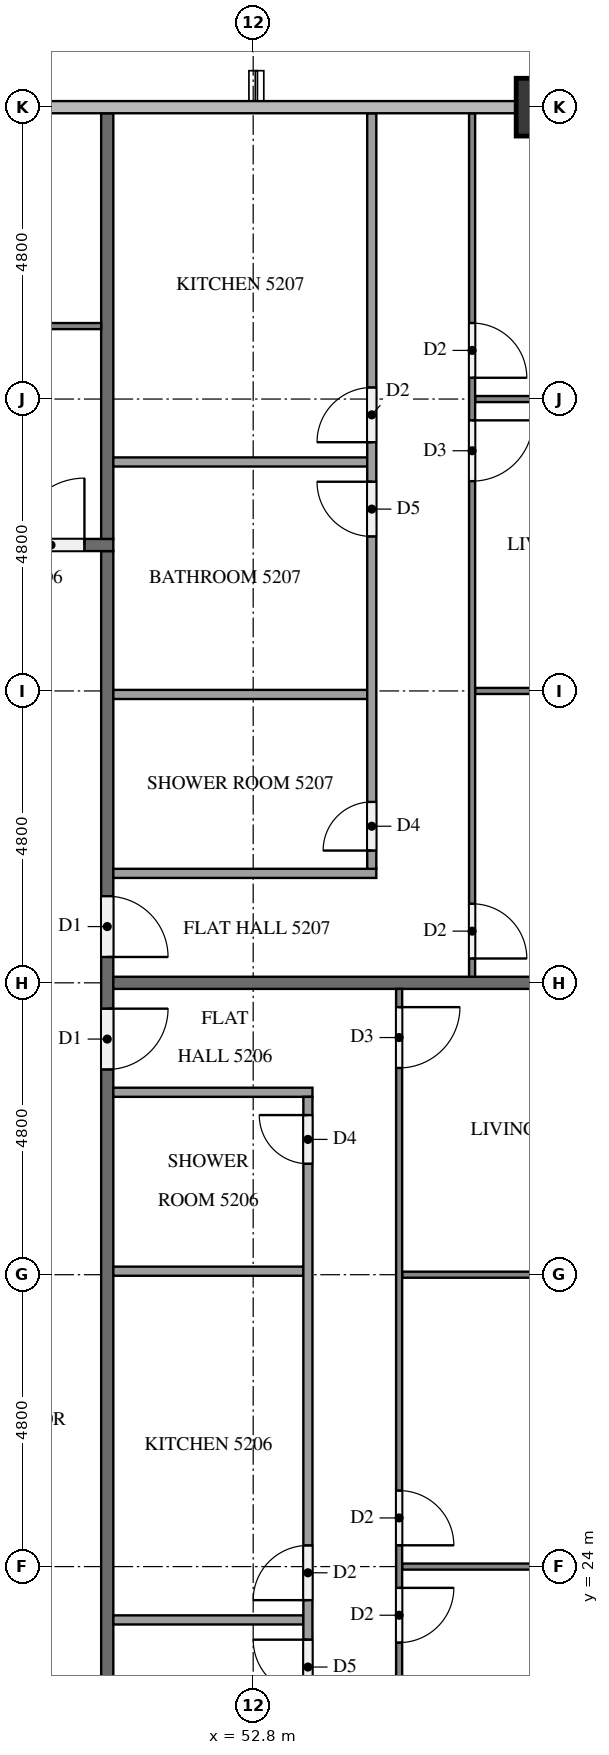
"""IFC4 building model, lengths in metres.
Left out: names, types, materials, properties, quantities, classifications, styles, units other than length and angle.
Written with IfcOpenShell. Run it as: python <this file> out.ifc"""

import sys

from ifc_helpers import new_model, si_unit, direction, frame, frame_2d, origin, origin_2d, place, context, subcontext, project, spatial, rectangle, extrude, element, fill, save


model = new_model("IFC4")
c1 = context("Model", 3, precision=1e-05, world=origin(), true_north=direction((0.0, 1.0)))
c2 = subcontext(c1, "Body", "Model", "MODEL_VIEW")
j1 = project(units=[si_unit("LENGTHUNIT", "METRE"), si_unit("PLANEANGLEUNIT", "RADIAN")], contexts=[c1])
p1 = place(None, origin())
s1 = spatial("IfcSite", under=j1, at=p1, CompositionType="ELEMENT")
p2 = place(p1, origin())
s2 = spatial("IfcBuilding", under=s1, at=p2, CompositionType="ELEMENT")
p3 = place(p2, frame((0.0, 0.0, 199.9)))
s3 = spatial("IfcBuildingStorey", under=s2, at=p3, CompositionType="ELEMENT", Elevation=199.9)
p4 = place(p3, frame((57.6, 48.0, 0.0), z_axis=(0.0, 0.0, 1.0), x_axis=(1.0, 0.0, 0.0)))
e1 = element("IfcColumn", 1, at=p4, inside=s3, PredefinedType="COLUMN", context=c2, shape_type="SweptSolid", body=[
    extrude(rectangle(XDim=0.95, YDim=0.95, at=origin_2d()), origin(), (0.0, 0.0, 1.0), 3.1),
])
p5 = place(p3, frame((50.4, 40.7, 0.0), z_axis=(0.0, 0.0, 1.0), x_axis=(0.0, -1.0, 0.0)))
e2 = element("IfcWall", 2, at=p5, inside=s3, PredefinedType="PARTITIONING", context=c2, shape_type="SweptSolid", body=[
    extrude(rectangle(XDim=28.6, YDim=0.2, at=frame_2d((14.3, 0.0))), origin(), (0.0, 0.0, 1.0), 3.1),
])
p6 = place(p5, frame((21.875, 0.0, 0.0)))
e3 = element("IfcOpeningElement", 3, at=p6, cuts=e2, PredefinedType="OPENING", context=c2, shape_type="SweptSolid", body=[
    extrude(rectangle(XDim=1.1, YDim=2.1, at=frame_2d((0.55, 1.05))), frame((0.0, 0.11, 0.0), z_axis=(0.0, -1.0, 0.0), x_axis=(1.0, 0.0, 0.0)), (0.0, 0.0, 1.0), 0.22),
])
p7 = place(p5, frame((7.525, 0.0, 0.0)))
e4 = element("IfcOpeningElement", 4, at=p7, cuts=e2, PredefinedType="OPENING", context=c2, shape_type="SweptSolid", body=[
    extrude(rectangle(XDim=1.0, YDim=2.1, at=frame_2d((0.5, 1.05))), frame((0.0, 0.11, 0.0), z_axis=(0.0, -1.0, 0.0), x_axis=(1.0, 0.0, 0.0)), (0.0, 0.0, 1.0), 0.22),
])
p8 = place(p5, frame((5.675, 0.0, 0.0)))
e5 = element("IfcOpeningElement", 5, at=p8, cuts=e2, PredefinedType="OPENING", context=c2, shape_type="SweptSolid", body=[
    extrude(rectangle(XDim=1.0, YDim=2.1, at=frame_2d((0.5, 1.05))), frame((0.0, 0.11, 0.0), z_axis=(0.0, -1.0, 0.0), x_axis=(1.0, 0.0, 0.0)), (0.0, 0.0, 1.0), 0.22),
])
p9 = place(p3, frame((11.9, 40.8, 0.0), z_axis=(0.0, 0.0, 1.0), x_axis=(1.0, 0.0, 0.0)))
e6 = element("IfcWall", 6, at=p9, inside=s3, PredefinedType="PARTITIONING", context=c2, shape_type="SweptSolid", body=[
    extrude(rectangle(XDim=38.6, YDim=0.2, at=frame_2d((19.3, 0.0))), origin(), (0.0, 0.0, 1.0), 3.1),
])
p10 = place(p9, frame((37.025, 0.0, 0.0)))
e7 = element("IfcOpeningElement", 7, at=p10, cuts=e6, PredefinedType="OPENING", context=c2, shape_type="SweptSolid", body=[
    extrude(rectangle(XDim=1.1, YDim=2.1, at=frame_2d((0.55, 1.05))), frame((0.0, 0.11, 0.0), z_axis=(0.0, -1.0, 0.0), x_axis=(1.0, 0.0, 0.0)), (0.0, 0.0, 1.0), 0.22),
])
p11 = place(p9, frame((17.825, 0.0, 0.0)))
e8 = element("IfcOpeningElement", 8, at=p11, cuts=e6, PredefinedType="OPENING", context=c2, shape_type="SweptSolid", body=[
    extrude(rectangle(XDim=1.1, YDim=2.1, at=frame_2d((0.55, 1.05))), frame((0.0, 0.11, 0.0), z_axis=(0.0, -1.0, 0.0), x_axis=(1.0, 0.0, 0.0)), (0.0, 0.0, 1.0), 0.22),
])
p12 = place(p3, frame((50.5, 33.6, 0.0), z_axis=(0.0, 0.0, 1.0), x_axis=(1.0, 0.0, 0.0)))
e9 = element("IfcWall", 9, at=p12, inside=s3, PredefinedType="PARTITIONING", context=c2, shape_type="SweptSolid", body=[
    extrude(rectangle(XDim=11.575, YDim=0.2, at=frame_2d((5.788, 0.0))), origin(), (0.0, 0.0, 1.0), 3.1),
])
p13 = place(p3, frame((50.4, 40.9, 0.0), z_axis=(0.0, 0.0, 1.0), x_axis=(0.0, 1.0, 0.0)))
e10 = element("IfcWall", 10, at=p13, inside=s3, PredefinedType="PARTITIONING", context=c2, shape_type="SweptSolid", body=[
    extrude(rectangle(XDim=7.0, YDim=0.2, at=frame_2d((3.5, 0.0))), origin(), (0.0, 0.0, 1.0), 3.1),
])
p14 = place(p3, frame((55.25, 28.8, 0.0), z_axis=(0.0, 0.0, 1.0), x_axis=(1.0, 0.0, 0.0)))
e11 = element("IfcWall", 11, at=p14, inside=s3, PredefinedType="PARTITIONING", context=c2, shape_type="SweptSolid", body=[
    extrude(rectangle(XDim=7.05, YDim=0.1, at=frame_2d((3.525, 0.0))), origin(), (0.0, 0.0, 1.0), 3.1),
])
p15 = place(p3, frame((55.25, 24.0, 0.0), z_axis=(0.0, 0.0, 1.0), x_axis=(1.0, 0.0, 0.0)))
e12 = element("IfcWall", 12, at=p15, inside=s3, PredefinedType="PARTITIONING", context=c2, shape_type="SweptSolid", body=[
    extrude(rectangle(XDim=6.825, YDim=0.1, at=frame_2d((3.413, 0.0))), origin(), (0.0, 0.0, 1.0), 3.1),
])
p16 = place(p3, frame((55.2, 33.5, 0.0), z_axis=(0.0, 0.0, 1.0), x_axis=(0.0, -1.0, 0.0)))
e13 = element("IfcWall", 13, at=p16, inside=s3, PredefinedType="PARTITIONING", context=c2, shape_type="SweptSolid", body=[
    extrude(rectangle(XDim=14.2, YDim=0.1, at=frame_2d((7.1, 0.0))), origin(), (0.0, 0.0, 1.0), 3.1),
])
p17 = place(p16, frame((0.3, 0.0, 0.0)))
e14 = element("IfcOpeningElement", 14, at=p17, cuts=e13, PredefinedType="OPENING", context=c2, shape_type="SweptSolid", body=[
    extrude(rectangle(XDim=1.0, YDim=2.1, at=frame_2d((0.5, 1.05))), frame((0.0, 0.06, 0.0), z_axis=(0.0, -1.0, 0.0), x_axis=(1.0, 0.0, 0.0)), (0.0, 0.0, 1.0), 0.12),
])
p18 = place(p16, frame((8.25, 0.0, 0.0)))
e15 = element("IfcOpeningElement", 15, at=p18, cuts=e13, PredefinedType="OPENING", context=c2, shape_type="SweptSolid", body=[
    extrude(rectangle(XDim=0.9, YDim=2.1, at=frame_2d((0.45, 1.05))), frame((0.0, 0.06, 0.0), z_axis=(0.0, -1.0, 0.0), x_axis=(1.0, 0.0, 0.0)), (0.0, 0.0, 1.0), 0.12),
])
p19 = place(p16, frame((9.85, 0.0, 0.0)))
e16 = element("IfcOpeningElement", 16, at=p19, cuts=e13, PredefinedType="OPENING", context=c2, shape_type="SweptSolid", body=[
    extrude(rectangle(XDim=0.9, YDim=2.1, at=frame_2d((0.45, 1.05))), frame((0.0, 0.06, 0.0), z_axis=(0.0, -1.0, 0.0), x_axis=(1.0, 0.0, 0.0)), (0.0, 0.0, 1.0), 0.12),
])
for number, where, z_axis, x_axis in (
    (17, (50.5, 28.858, 0.0), (0.0, 0.0, 1.0), (1.0, 0.0, 0.0)),
    (18, (50.5, 23.123, 0.0), (0.0, 0.0, 1.0), (1.0, 0.0, 0.0)),
):
    element("IfcWall", number, at=place(p3, frame(where, z_axis=z_axis, x_axis=x_axis)), inside=s3, PredefinedType="PARTITIONING", context=c2, shape_type="SweptSolid", body=[
        extrude(rectangle(XDim=3.125, YDim=0.15, at=frame_2d((1.562, 0.0))), origin(), (0.0, 0.0, 1.0), 3.1),
    ])
p20 = place(p3, frame((50.5, 31.8, 0.0), z_axis=(0.0, 0.0, 1.0), x_axis=(1.0, 0.0, 0.0)))
e19 = element("IfcWall", 19, at=p20, inside=s3, PredefinedType="PARTITIONING", context=c2, shape_type="SweptSolid", body=[
    extrude(rectangle(XDim=3.275, YDim=0.15, at=frame_2d((1.637, 0.0))), origin(), (0.0, 0.0, 1.0), 3.1),
])
p21 = place(p3, frame((53.7, 19.3, 0.0), z_axis=(0.0, 0.0, 1.0), x_axis=(0.0, 1.0, 0.0)))
e20 = element("IfcWall", 20, at=p21, inside=s3, PredefinedType="PARTITIONING", context=c2, shape_type="SweptSolid", body=[
    extrude(rectangle(XDim=12.425, YDim=0.15, at=frame_2d((6.212, 0.0))), origin(), (0.0, 0.0, 1.0), 3.1),
])
p22 = place(p21, frame((11.325, 0.0, 0.0)))
e21 = element("IfcOpeningElement", 21, at=p22, cuts=e20, PredefinedType="OPENING", context=c2, shape_type="SweptSolid", body=[
    extrude(rectangle(XDim=0.8, YDim=2.1, at=frame_2d((0.4, 1.05))), frame((0.0, 0.085, 0.0), z_axis=(0.0, -1.0, 0.0), x_axis=(1.0, 0.0, 0.0)), (0.0, 0.0, 1.0), 0.17),
])
p23 = place(p21, frame((4.148, 0.0, 0.0)))
e22 = element("IfcOpeningElement", 22, at=p23, cuts=e20, PredefinedType="OPENING", context=c2, shape_type="SweptSolid", body=[
    extrude(rectangle(XDim=0.9, YDim=2.1, at=frame_2d((0.45, 1.05))), frame((0.0, 0.085, 0.0), z_axis=(0.0, -1.0, 0.0), x_axis=(1.0, 0.0, 0.0)), (0.0, 0.0, 1.0), 0.17),
])
p24 = place(p21, frame((2.598, 0.0, 0.0)))
e23 = element("IfcOpeningElement", 23, at=p24, cuts=e20, PredefinedType="OPENING", context=c2, shape_type="SweptSolid", body=[
    extrude(rectangle(XDim=0.9, YDim=2.1, at=frame_2d((0.45, 1.05))), frame((0.0, 0.085, 0.0), z_axis=(0.0, -1.0, 0.0), x_axis=(1.0, 0.0, 0.0)), (0.0, 0.0, 1.0), 0.17),
])
p25 = place(p3, frame((56.45, 38.4, 0.0), z_axis=(0.0, 0.0, 1.0), x_axis=(1.0, 0.0, 0.0)))
e24 = element("IfcWall", 24, at=p25, inside=s3, PredefinedType="PARTITIONING", context=c2, shape_type="SweptSolid", body=[
    extrude(rectangle(XDim=5.85, YDim=0.1, at=frame_2d((2.925, 0.0))), origin(), (0.0, 0.0, 1.0), 3.1),
])
p26 = place(p3, frame((56.45, 43.2, 0.0), z_axis=(0.0, 0.0, 1.0), x_axis=(1.0, 0.0, 0.0)))
e25 = element("IfcWall", 25, at=p26, inside=s3, PredefinedType="PARTITIONING", context=c2, shape_type="SweptSolid", body=[
    extrude(rectangle(XDim=5.475, YDim=0.1, at=frame_2d((2.738, 0.0))), origin(), (0.0, 0.0, 1.0), 3.1),
])
p27 = place(p3, frame((56.4, 47.9, 0.0), z_axis=(0.0, 0.0, 1.0), x_axis=(0.0, -1.0, 0.0)))
e26 = element("IfcWall", 26, at=p27, inside=s3, PredefinedType="PARTITIONING", context=c2, shape_type="SweptSolid", body=[
    extrude(rectangle(XDim=14.2, YDim=0.1, at=frame_2d((7.1, 0.0))), origin(), (0.0, 0.0, 1.0), 3.1),
])
p28 = place(p27, frame((13.0, 0.0, 0.0)))
e27 = element("IfcOpeningElement", 27, at=p28, cuts=e26, PredefinedType="OPENING", context=c2, shape_type="SweptSolid", body=[
    extrude(rectangle(XDim=0.9, YDim=2.1, at=frame_2d((0.45, 1.05))), frame((0.0, 0.06, 0.0), z_axis=(0.0, -1.0, 0.0), x_axis=(1.0, 0.0, 0.0)), (0.0, 0.0, 1.0), 0.12),
])
p29 = place(p27, frame((5.05, 0.0, 0.0)))
e28 = element("IfcOpeningElement", 28, at=p29, cuts=e26, PredefinedType="OPENING", context=c2, shape_type="SweptSolid", body=[
    extrude(rectangle(XDim=1.0, YDim=2.1, at=frame_2d((0.5, 1.05))), frame((0.0, 0.06, 0.0), z_axis=(0.0, -1.0, 0.0), x_axis=(1.0, 0.0, 0.0)), (0.0, 0.0, 1.0), 0.12),
])
p30 = place(p27, frame((3.45, 0.0, 0.0)))
e29 = element("IfcOpeningElement", 29, at=p30, cuts=e26, PredefinedType="OPENING", context=c2, shape_type="SweptSolid", body=[
    extrude(rectangle(XDim=0.9, YDim=2.1, at=frame_2d((0.45, 1.05))), frame((0.0, 0.06, 0.0), z_axis=(0.0, -1.0, 0.0), x_axis=(1.0, 0.0, 0.0)), (0.0, 0.0, 1.0), 0.12),
])
for number, where, z_axis, x_axis in (
    (30, (50.5, 38.342, 0.0), (0.0, 0.0, 1.0), (1.0, 0.0, 0.0)),
    (31, (50.5, 42.165, 0.0), (0.0, 0.0, 1.0), (1.0, 0.0, 0.0)),
):
    element("IfcWall", number, at=place(p3, frame(where, z_axis=z_axis, x_axis=x_axis)), inside=s3, PredefinedType="PARTITIONING", context=c2, shape_type="SweptSolid", body=[
        extrude(rectangle(XDim=4.175, YDim=0.15, at=frame_2d((2.087, 0.0))), origin(), (0.0, 0.0, 1.0), 3.1),
    ])
p31 = place(p3, frame((50.5, 35.4, 0.0), z_axis=(0.0, 0.0, 1.0), x_axis=(1.0, 0.0, 0.0)))
e32 = element("IfcWall", 32, at=p31, inside=s3, PredefinedType="PARTITIONING", context=c2, shape_type="SweptSolid", body=[
    extrude(rectangle(XDim=4.325, YDim=0.15, at=frame_2d((2.163, 0.0))), origin(), (0.0, 0.0, 1.0), 3.1),
])
p32 = place(p3, frame((54.75, 35.475, 0.0), z_axis=(0.0, 0.0, 1.0), x_axis=(0.0, 1.0, 0.0)))
e33 = element("IfcWall", 33, at=p32, inside=s3, PredefinedType="PARTITIONING", context=c2, shape_type="SweptSolid", body=[
    extrude(rectangle(XDim=12.425, YDim=0.15, at=frame_2d((6.212, 0.0))), origin(), (0.0, 0.0, 1.0), 3.1),
])
p33 = place(p32, frame((0.3, 0.0, 0.0)))
e34 = element("IfcOpeningElement", 34, at=p33, cuts=e33, PredefinedType="OPENING", context=c2, shape_type="SweptSolid", body=[
    extrude(rectangle(XDim=0.8, YDim=2.1, at=frame_2d((0.4, 1.05))), frame((0.0, 0.085, 0.0), z_axis=(0.0, -1.0, 0.0), x_axis=(1.0, 0.0, 0.0)), (0.0, 0.0, 1.0), 0.17),
])
p34 = place(p32, frame((5.465, 0.0, 0.0)))
e35 = element("IfcOpeningElement", 35, at=p34, cuts=e33, PredefinedType="OPENING", context=c2, shape_type="SweptSolid", body=[
    extrude(rectangle(XDim=0.9, YDim=2.1, at=frame_2d((0.45, 1.05))), frame((0.0, 0.085, 0.0), z_axis=(0.0, -1.0, 0.0), x_axis=(1.0, 0.0, 0.0)), (0.0, 0.0, 1.0), 0.17),
])
p35 = place(p32, frame((7.015, 0.0, 0.0)))
e36 = element("IfcOpeningElement", 36, at=p35, cuts=e33, PredefinedType="OPENING", context=c2, shape_type="SweptSolid", body=[
    extrude(rectangle(XDim=0.9, YDim=2.1, at=frame_2d((0.45, 1.05))), frame((0.0, 0.085, 0.0), z_axis=(0.0, -1.0, 0.0), x_axis=(1.0, 0.0, 0.0)), (0.0, 0.0, 1.0), 0.17),
])
p36 = place(p3, frame((31.3, 44.4, 0.0), z_axis=(0.0, 0.0, 1.0), x_axis=(1.0, 0.0, 0.0)))
e37 = element("IfcWall", 37, at=p36, inside=s3, PredefinedType="PARTITIONING", context=c2, shape_type="SweptSolid", body=[
    extrude(rectangle(XDim=19.0, YDim=0.1, at=frame_2d((9.5, 0.0))), origin(), (0.0, 0.0, 1.0), 3.1),
])
p37 = place(p36, frame((14.65, 0.0, 0.0)))
e38 = element("IfcOpeningElement", 38, at=p37, cuts=e37, PredefinedType="OPENING", context=c2, shape_type="SweptSolid", body=[
    extrude(rectangle(XDim=0.9, YDim=2.1, at=frame_2d((0.45, 1.05))), frame((0.0, 0.06, 0.0), z_axis=(0.0, -1.0, 0.0), x_axis=(1.0, 0.0, 0.0)), (0.0, 0.0, 1.0), 0.12),
])
p38 = place(p36, frame((12.95, 0.0, 0.0)))
e39 = element("IfcOpeningElement", 39, at=p38, cuts=e37, PredefinedType="OPENING", context=c2, shape_type="SweptSolid", body=[
    extrude(rectangle(XDim=1.0, YDim=2.1, at=frame_2d((0.5, 1.05))), frame((0.0, 0.06, 0.0), z_axis=(0.0, -1.0, 0.0), x_axis=(1.0, 0.0, 0.0)), (0.0, 0.0, 1.0), 0.12),
])
p39 = place(p36, frame((5.05, 0.0, 0.0)))
e40 = element("IfcOpeningElement", 40, at=p39, cuts=e37, PredefinedType="OPENING", context=c2, shape_type="SweptSolid", body=[
    extrude(rectangle(XDim=0.9, YDim=2.1, at=frame_2d((0.45, 1.05))), frame((0.0, 0.06, 0.0), z_axis=(0.0, -1.0, 0.0), x_axis=(1.0, 0.0, 0.0)), (0.0, 0.0, 1.0), 0.12),
])
p40 = place(p36, frame((3.45, 0.0, 0.0)))
e41 = element("IfcOpeningElement", 41, at=p40, cuts=e37, PredefinedType="OPENING", context=c2, shape_type="SweptSolid", body=[
    extrude(rectangle(XDim=0.9, YDim=2.1, at=frame_2d((0.45, 1.05))), frame((0.0, 0.06, 0.0), z_axis=(0.0, -1.0, 0.0), x_axis=(1.0, 0.0, 0.0)), (0.0, 0.0, 1.0), 0.12),
])
p41 = place(p7, origin())
e42 = element("IfcDoor", 42, at=p41, inside=s3, OperationType="SINGLE_SWING_LEFT", PredefinedType="DOOR", context=c2, shape_type="SweptSolid", body=[
    extrude(rectangle(XDim=1.0, YDim=2.1, at=frame_2d((0.5, 1.05))), frame((0.0, 0.025, 0.0), z_axis=(0.0, -1.0, 0.0), x_axis=(1.0, 0.0, 0.0)), (0.0, 0.0, 1.0), 0.05),
])
fill(e4, e42)
p42 = place(p8, origin())
e43 = element("IfcDoor", 43, at=p42, inside=s3, OperationType="SINGLE_SWING_RIGHT", PredefinedType="DOOR", context=c2, shape_type="SweptSolid", body=[
    extrude(rectangle(XDim=1.0, YDim=2.1, at=frame_2d((0.5, 1.05))), frame((0.0, 0.025, 0.0), z_axis=(0.0, -1.0, 0.0), x_axis=(1.0, 0.0, 0.0)), (0.0, 0.0, 1.0), 0.05),
])
fill(e5, e43)
p43 = place(p10, origin())
e44 = element("IfcDoor", 44, at=p43, inside=s3, OperationType="SINGLE_SWING_RIGHT", PredefinedType="DOOR", context=c2, shape_type="SweptSolid", body=[
    extrude(rectangle(XDim=1.1, YDim=2.1, at=frame_2d((0.55, 1.05))), frame((0.0, 0.025, 0.0), z_axis=(0.0, -1.0, 0.0), x_axis=(1.0, 0.0, 0.0)), (0.0, 0.0, 1.0), 0.05),
])
fill(e7, e44)
p44 = place(p17, origin())
e45 = element("IfcDoor", 45, at=p44, inside=s3, OperationType="SINGLE_SWING_LEFT", PredefinedType="DOOR", context=c2, shape_type="SweptSolid", body=[
    extrude(rectangle(XDim=1.0, YDim=2.1, at=frame_2d((0.5, 1.05))), frame((0.0, 0.025, 0.0), z_axis=(0.0, -1.0, 0.0), x_axis=(1.0, 0.0, 0.0)), (0.0, 0.0, 1.0), 0.05),
])
fill(e14, e45)
p45 = place(p18, origin())
e46 = element("IfcDoor", 46, at=p45, inside=s3, OperationType="SINGLE_SWING_RIGHT", PredefinedType="DOOR", context=c2, shape_type="SweptSolid", body=[
    extrude(rectangle(XDim=0.9, YDim=2.1, at=frame_2d((0.45, 1.05))), frame((0.0, 0.025, 0.0), z_axis=(0.0, -1.0, 0.0), x_axis=(1.0, 0.0, 0.0)), (0.0, 0.0, 1.0), 0.05),
])
fill(e15, e46)
p46 = place(p19, origin())
e47 = element("IfcDoor", 47, at=p46, inside=s3, OperationType="SINGLE_SWING_LEFT", PredefinedType="DOOR", context=c2, shape_type="SweptSolid", body=[
    extrude(rectangle(XDim=0.9, YDim=2.1, at=frame_2d((0.45, 1.05))), frame((0.0, 0.025, 0.0), z_axis=(0.0, -1.0, 0.0), x_axis=(1.0, 0.0, 0.0)), (0.0, 0.0, 1.0), 0.05),
])
fill(e16, e47)
p47 = place(p22, origin())
e48 = element("IfcDoor", 48, at=p47, inside=s3, OperationType="SINGLE_SWING_RIGHT", PredefinedType="DOOR", context=c2, shape_type="SweptSolid", body=[
    extrude(rectangle(XDim=0.8, YDim=2.1, at=frame_2d((0.4, 1.05))), frame((0.0, 0.025, 0.0), z_axis=(0.0, -1.0, 0.0), x_axis=(1.0, 0.0, 0.0)), (0.0, 0.0, 1.0), 0.05),
])
fill(e21, e48)
p48 = place(p23, origin())
e49 = element("IfcDoor", 49, at=p48, inside=s3, OperationType="SINGLE_SWING_LEFT", PredefinedType="DOOR", context=c2, shape_type="SweptSolid", body=[
    extrude(rectangle(XDim=0.9, YDim=2.1, at=frame_2d((0.45, 1.05))), frame((0.0, 0.025, 0.0), z_axis=(0.0, -1.0, 0.0), x_axis=(1.0, 0.0, 0.0)), (0.0, 0.0, 1.0), 0.05),
])
fill(e22, e49)
p49 = place(p24, origin())
e50 = element("IfcDoor", 50, at=p49, inside=s3, OperationType="SINGLE_SWING_RIGHT", PredefinedType="DOOR", context=c2, shape_type="SweptSolid", body=[
    extrude(rectangle(XDim=0.9, YDim=2.1, at=frame_2d((0.45, 1.05))), frame((0.0, 0.025, 0.0), z_axis=(0.0, -1.0, 0.0), x_axis=(1.0, 0.0, 0.0)), (0.0, 0.0, 1.0), 0.05),
])
fill(e23, e50)
p50 = place(p28, origin())
e51 = element("IfcDoor", 51, at=p50, inside=s3, OperationType="SINGLE_SWING_RIGHT", PredefinedType="DOOR", context=c2, shape_type="SweptSolid", body=[
    extrude(rectangle(XDim=0.9, YDim=2.1, at=frame_2d((0.45, 1.05))), frame((0.0, 0.025, 0.0), z_axis=(0.0, -1.0, 0.0), x_axis=(1.0, 0.0, 0.0)), (0.0, 0.0, 1.0), 0.05),
])
fill(e27, e51)
p51 = place(p29, origin())
e52 = element("IfcDoor", 52, at=p51, inside=s3, OperationType="SINGLE_SWING_LEFT", PredefinedType="DOOR", context=c2, shape_type="SweptSolid", body=[
    extrude(rectangle(XDim=1.0, YDim=2.1, at=frame_2d((0.5, 1.05))), frame((0.0, 0.025, 0.0), z_axis=(0.0, -1.0, 0.0), x_axis=(1.0, 0.0, 0.0)), (0.0, 0.0, 1.0), 0.05),
])
fill(e28, e52)
p52 = place(p30, origin())
e53 = element("IfcDoor", 53, at=p52, inside=s3, OperationType="SINGLE_SWING_RIGHT", PredefinedType="DOOR", context=c2, shape_type="SweptSolid", body=[
    extrude(rectangle(XDim=0.9, YDim=2.1, at=frame_2d((0.45, 1.05))), frame((0.0, 0.025, 0.0), z_axis=(0.0, -1.0, 0.0), x_axis=(1.0, 0.0, 0.0)), (0.0, 0.0, 1.0), 0.05),
])
fill(e29, e53)
p53 = place(p33, origin())
e54 = element("IfcDoor", 54, at=p53, inside=s3, OperationType="SINGLE_SWING_LEFT", PredefinedType="DOOR", context=c2, shape_type="SweptSolid", body=[
    extrude(rectangle(XDim=0.8, YDim=2.1, at=frame_2d((0.4, 1.05))), frame((0.0, 0.025, 0.0), z_axis=(0.0, -1.0, 0.0), x_axis=(1.0, 0.0, 0.0)), (0.0, 0.0, 1.0), 0.05),
])
fill(e34, e54)
p54 = place(p34, origin())
e55 = element("IfcDoor", 55, at=p54, inside=s3, OperationType="SINGLE_SWING_RIGHT", PredefinedType="DOOR", context=c2, shape_type="SweptSolid", body=[
    extrude(rectangle(XDim=0.9, YDim=2.1, at=frame_2d((0.45, 1.05))), frame((0.0, 0.025, 0.0), z_axis=(0.0, -1.0, 0.0), x_axis=(1.0, 0.0, 0.0)), (0.0, 0.0, 1.0), 0.05),
])
fill(e35, e55)
p55 = place(p35, origin())
e56 = element("IfcDoor", 56, at=p55, inside=s3, OperationType="SINGLE_SWING_LEFT", PredefinedType="DOOR", context=c2, shape_type="SweptSolid", body=[
    extrude(rectangle(XDim=0.9, YDim=2.1, at=frame_2d((0.45, 1.05))), frame((0.0, 0.025, 0.0), z_axis=(0.0, -1.0, 0.0), x_axis=(1.0, 0.0, 0.0)), (0.0, 0.0, 1.0), 0.05),
])
fill(e36, e56)
save(model, sys.argv[1])
